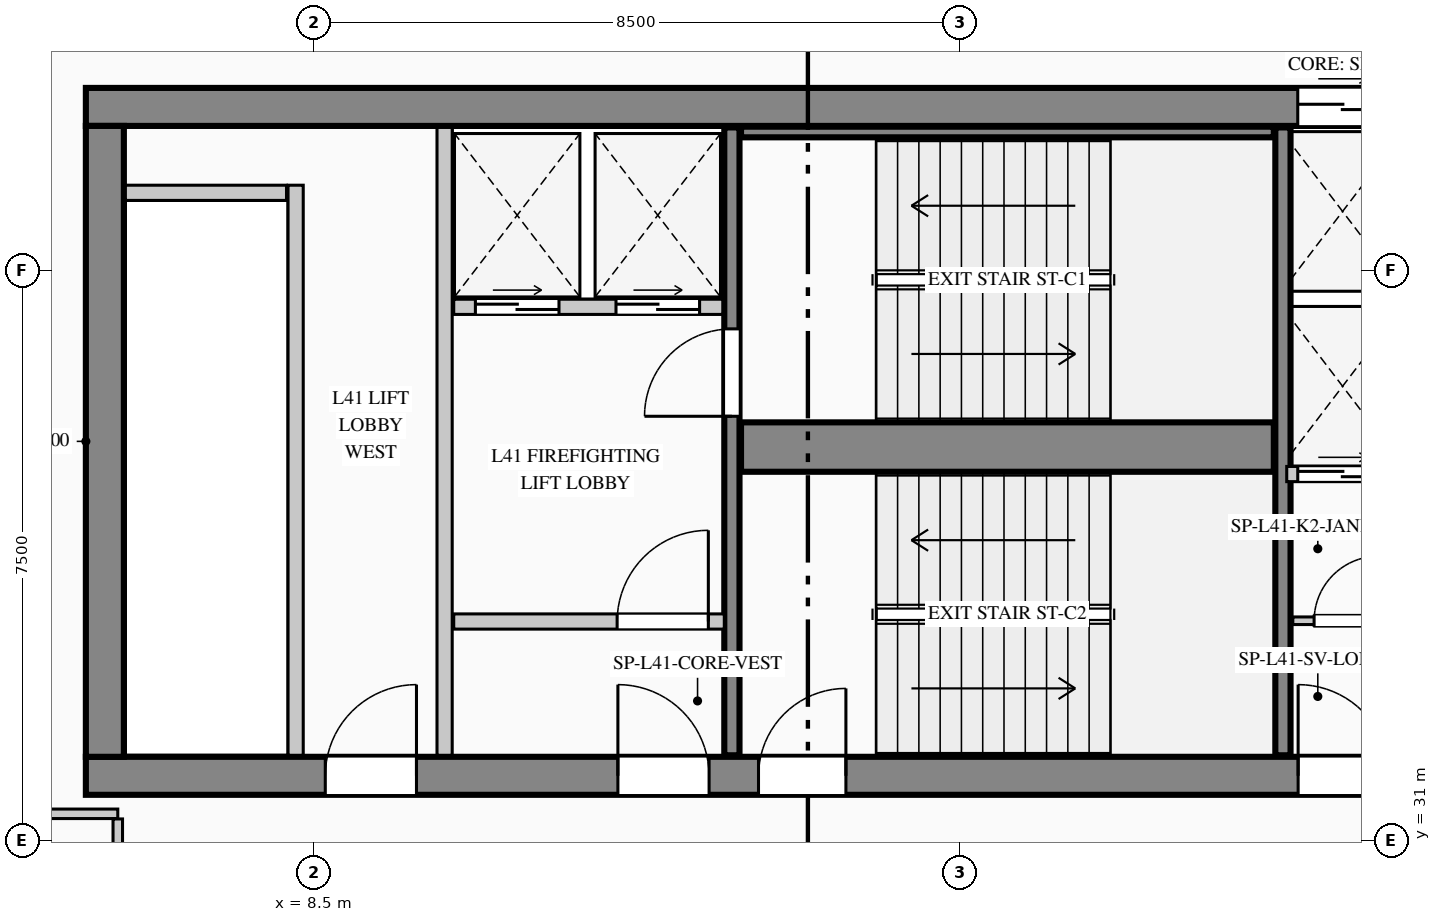
"""IFC4 building model, lengths in metres.
Left out: names, types, materials, properties, quantities, classifications, styles, units other than length and angle.
Written with IfcOpenShell. Run it as: python <this file> out.ifc"""

import sys

from ifc_helpers import new_model, si_unit, direction, frame, frame_2d, origin, place, context, subcontext, project, spatial, rectangle, extrude, element, fill, save


model = new_model("IFC4")
c1 = context("Model", 3, precision=1e-05, world=origin(), true_north=direction((0.0, 1.0)))
c2 = subcontext(c1, "Body", "Model", "MODEL_VIEW")
j1 = project(units=[si_unit("LENGTHUNIT", "METRE"), si_unit("PLANEANGLEUNIT", "RADIAN")], contexts=[c1])
p1 = place(None, origin())
s1 = spatial("IfcSite", under=j1, at=p1, CompositionType="ELEMENT")
p2 = place(p1, origin())
s2 = spatial("IfcBuilding", under=s1, at=p2, CompositionType="ELEMENT")
p3 = place(p2, frame((0.0, 0.0, 174.6)))
s3 = spatial("IfcBuildingStorey", under=s2, at=p3, CompositionType="ELEMENT", Elevation=174.6)
p4 = place(p3, frame((5.5, 40.65, 0.0), z_axis=(0.0, 0.0, 1.0), x_axis=(1.0, 0.0, 0.0)))
e1 = element("IfcWall", 1, at=p4, inside=s3, PredefinedType="SHEAR", context=c2, shape_type="SweptSolid", body=[
    extrude(rectangle(XDim=17.85, YDim=0.5, at=frame_2d((8.925, 0.0))), origin(), (0.0, 0.0, 1.0), 3.95),
])
p5 = place(p4, frame((15.945, 0.0, 0.0)))
e2 = element("IfcOpeningElement", 2, at=p5, cuts=e1, PredefinedType="OPENING", context=c2, shape_type="SweptSolid", body=[
    extrude(rectangle(XDim=1.18, YDim=2.25, at=frame_2d((0.59, 1.125))), frame((0.0, 0.26, 0.0), z_axis=(0.0, -1.0, 0.0), x_axis=(1.0, 0.0, 0.0)), (0.0, 0.0, 1.0), 0.52),
])
p6 = place(p3, frame((5.5, 31.85, 0.0), z_axis=(0.0, 0.0, 1.0), x_axis=(1.0, 0.0, 0.0)))
e3 = element("IfcWall", 3, at=p6, inside=s3, PredefinedType="SHEAR", context=c2, shape_type="SweptSolid", body=[
    extrude(rectangle(XDim=17.85, YDim=0.5, at=frame_2d((8.925, 0.0))), origin(), (0.0, 0.0, 1.0), 3.95),
])
p7 = place(p6, frame((3.15, 0.0, 0.0)))
e4 = element("IfcOpeningElement", 4, at=p7, cuts=e3, PredefinedType="OPENING", context=c2, shape_type="SweptSolid", body=[
    extrude(rectangle(XDim=1.2, YDim=2.2, at=frame_2d((0.6, 1.1))), frame((0.0, 0.26, 0.0), z_axis=(0.0, -1.0, 0.0), x_axis=(1.0, 0.0, 0.0)), (0.0, 0.0, 1.0), 0.52),
])
p8 = place(p6, frame((7.0, 0.0, 0.0)))
e5 = element("IfcOpeningElement", 5, at=p8, cuts=e3, PredefinedType="OPENING", context=c2, shape_type="SweptSolid", body=[
    extrude(rectangle(XDim=1.2, YDim=2.2, at=frame_2d((0.6, 1.1))), frame((0.0, 0.26, 0.0), z_axis=(0.0, -1.0, 0.0), x_axis=(1.0, 0.0, 0.0)), (0.0, 0.0, 1.0), 0.52),
])
p9 = place(p6, frame((8.85, 0.0, 0.0)))
e6 = element("IfcOpeningElement", 6, at=p9, cuts=e3, PredefinedType="OPENING", context=c2, shape_type="SweptSolid", body=[
    extrude(rectangle(XDim=1.15, YDim=2.2, at=frame_2d((0.575, 1.1))), frame((0.0, 0.26, 0.0), z_axis=(0.0, -1.0, 0.0), x_axis=(1.0, 0.0, 0.0)), (0.0, 0.0, 1.0), 0.52),
])
p10 = place(p6, frame((15.95, 0.0, 0.0)))
e7 = element("IfcOpeningElement", 7, at=p10, cuts=e3, PredefinedType="OPENING", context=c2, shape_type="SweptSolid", body=[
    extrude(rectangle(XDim=1.2, YDim=2.2, at=frame_2d((0.6, 1.1))), frame((0.0, 0.26, 0.0), z_axis=(0.0, -1.0, 0.0), x_axis=(1.0, 0.0, 0.0)), (0.0, 0.0, 1.0), 0.52),
])
p11 = place(p3, frame((5.75, 32.1, 0.0), z_axis=(0.0, 0.0, 1.0), x_axis=(0.0, 1.0, 0.0)))
e8 = element("IfcWall", 8, at=p11, inside=s3, PredefinedType="SHEAR", context=c2, shape_type="SweptSolid", body=[
    extrude(rectangle(XDim=8.3, YDim=0.5, at=frame_2d((4.15, 0.0))), origin(), (0.0, 0.0, 1.0), 3.95),
])
p12 = place(p3, frame((14.0, 32.12, 0.0), z_axis=(0.0, 0.0, 1.0), x_axis=(0.0, 1.0, 0.0)))
e9 = element("IfcWall", 9, at=p12, inside=s3, PredefinedType="SHEAR", context=c2, shape_type="SweptSolid", body=[
    extrude(rectangle(XDim=8.26, YDim=0.2, at=frame_2d((4.13, 0.0))), origin(), (0.0, 0.0, 1.0), 3.95),
])
p13 = place(p12, frame((4.46, 0.0, 0.0)))
e10 = element("IfcOpeningElement", 10, at=p13, cuts=e9, PredefinedType="OPENING", context=c2, shape_type="SweptSolid", body=[
    extrude(rectangle(XDim=1.15, YDim=2.2, at=frame_2d((0.575, 1.1))), frame((0.0, 0.11, 0.0), z_axis=(0.0, -1.0, 0.0), x_axis=(1.0, 0.0, 0.0)), (0.0, 0.0, 1.0), 0.22),
])
p14 = place(p3, frame((14.12, 36.175, 0.0), z_axis=(0.0, 0.0, 1.0), x_axis=(1.0, 0.0, 0.0)))
e11 = element("IfcWall", 11, at=p14, inside=s3, PredefinedType="SHEAR", context=c2, shape_type="SweptSolid", body=[
    extrude(rectangle(XDim=7.01, YDim=0.65, at=frame_2d((3.505, 0.0))), origin(), (0.0, 0.0, 1.0), 3.95),
])
p15 = place(p3, frame((21.25, 32.12, 0.0), z_axis=(0.0, 0.0, 1.0), x_axis=(0.0, 1.0, 0.0)))
e12 = element("IfcWall", 12, at=p15, inside=s3, PredefinedType="SHEAR", context=c2, shape_type="SweptSolid", body=[
    extrude(rectangle(XDim=8.26, YDim=0.2, at=frame_2d((4.13, 0.0))), origin(), (0.0, 0.0, 1.0), 3.95),
])
p16 = place(p3, frame((14.12, 40.32, 0.0), z_axis=(0.0, 0.0, 1.0), x_axis=(1.0, 0.0, 0.0)))
e13 = element("IfcWall", 13, at=p16, inside=s3, PredefinedType="SHEAR", context=c2, shape_type="SweptSolid", body=[
    extrude(rectangle(XDim=7.01, YDim=0.14, at=frame_2d((3.505, 0.0))), origin(), (0.0, 0.0, 1.0), 3.95),
])
p17 = place(p3, frame((7.993, 4.73, 0.0), z_axis=(0.0, 0.0, 1.0), x_axis=(-0.136989009016, 0.990572567462, 0.0)))
e14 = element("IfcWall", 14, at=p17, inside=s3, PredefinedType="STANDARD", context=c2, shape_type="SweptSolid", body=[
    extrude(rectangle(XDim=36.888, YDim=0.26, at=frame_2d((18.444, 0.0))), origin(), (0.0, 0.0, 1.0), 3.6),
])
p18 = place(p17, frame((20.949, 0.0, 0.9)))
e15 = element("IfcOpeningElement", 15, at=p18, cuts=e14, PredefinedType="OPENING", context=c2, shape_type="SweptSolid", body=[
    extrude(rectangle(XDim=2.1, YDim=2.0, at=frame_2d((1.05, 1.0))), frame((0.0, 0.14, 0.0), z_axis=(0.0, -1.0, 0.0), x_axis=(1.0, 0.0, 0.0)), (0.0, 0.0, 1.0), 0.28),
])
p19 = place(p3, frame((8.26, 32.12, 0.0), z_axis=(0.0, 0.0, 1.0), x_axis=(0.0, 1.0, 0.0)))
e16 = element("IfcWall", 16, at=p19, inside=s3, PredefinedType="PARTITIONING", context=c2, shape_type="SweptSolid", body=[
    extrude(rectangle(XDim=7.5, YDim=0.2, at=frame_2d((3.75, 0.0))), origin(), (0.0, 0.0, 1.0), 3.6),
])
p20 = place(p3, frame((6.02, 39.52, 0.0), z_axis=(0.0, 0.0, 1.0), x_axis=(1.0, 0.0, 0.0)))
e17 = element("IfcWall", 17, at=p20, inside=s3, PredefinedType="PARTITIONING", context=c2, shape_type="SweptSolid", body=[
    extrude(rectangle(XDim=2.12, YDim=0.2, at=frame_2d((1.06, 0.0))), origin(), (0.0, 0.0, 1.0), 3.6),
])
p21 = place(p3, frame((10.22, 32.12, 0.0), z_axis=(0.0, 0.0, 1.0), x_axis=(0.0, 1.0, 0.0)))
e18 = element("IfcWall", 18, at=p21, inside=s3, PredefinedType="PARTITIONING", context=c2, shape_type="SweptSolid", body=[
    extrude(rectangle(XDim=8.26, YDim=0.2, at=frame_2d((4.13, 0.0))), origin(), (0.0, 0.0, 1.0), 3.6),
])
p22 = place(p3, frame((10.34, 38.02, 0.0), z_axis=(0.0, 0.0, 1.0), x_axis=(1.0, 0.0, 0.0)))
e19 = element("IfcWall", 19, at=p22, inside=s3, PredefinedType="PARTITIONING", context=c2, shape_type="SweptSolid", body=[
    extrude(rectangle(XDim=3.54, YDim=0.2, at=frame_2d((1.77, 0.0))), origin(), (0.0, 0.0, 1.0), 3.6),
])
p23 = place(p22, frame((0.285, 0.0, 0.0)))
e20 = element("IfcOpeningElement", 20, at=p23, cuts=e19, PredefinedType="OPENING", context=c2, shape_type="SweptSolid", body=[
    extrude(rectangle(XDim=1.1, YDim=2.2, at=frame_2d((0.55, 1.1))), frame((0.0, 0.11, 0.0), z_axis=(0.0, -1.0, 0.0), x_axis=(1.0, 0.0, 0.0)), (0.0, 0.0, 1.0), 0.22),
])
p24 = place(p22, frame((2.135, 0.0, 0.0)))
e21 = element("IfcOpeningElement", 21, at=p24, cuts=e19, PredefinedType="OPENING", context=c2, shape_type="SweptSolid", body=[
    extrude(rectangle(XDim=1.1, YDim=2.2, at=frame_2d((0.55, 1.1))), frame((0.0, 0.11, 0.0), z_axis=(0.0, -1.0, 0.0), x_axis=(1.0, 0.0, 0.0)), (0.0, 0.0, 1.0), 0.22),
])
p25 = place(p3, frame((10.34, 33.88, 0.0), z_axis=(0.0, 0.0, 1.0), x_axis=(1.0, 0.0, 0.0)))
e22 = element("IfcWall", 22, at=p25, inside=s3, PredefinedType="PARTITIONING", context=c2, shape_type="SweptSolid", body=[
    extrude(rectangle(XDim=3.56, YDim=0.2, at=frame_2d((1.78, 0.0))), origin(), (0.0, 0.0, 1.0), 3.6),
])
p26 = place(p25, frame((2.15, 0.0, 0.0)))
e23 = element("IfcOpeningElement", 23, at=p26, cuts=e22, PredefinedType="OPENING", context=c2, shape_type="SweptSolid", body=[
    extrude(rectangle(XDim=1.2, YDim=2.2, at=frame_2d((0.6, 1.1))), frame((0.0, 0.11, 0.0), z_axis=(0.0, -1.0, 0.0), x_axis=(1.0, 0.0, 0.0)), (0.0, 0.0, 1.0), 0.22),
])
p27 = place(p3, frame((21.38, 33.89, 0.0), z_axis=(0.0, 0.0, 1.0), x_axis=(1.0, 0.0, 0.0)))
e24 = element("IfcWall", 24, at=p27, inside=s3, PredefinedType="PARTITIONING", context=c2, shape_type="SweptSolid", body=[
    extrude(rectangle(XDim=1.42, YDim=0.1, at=frame_2d((0.71, 0.0))), origin(), (0.0, 0.0, 1.0), 3.6),
])
p28 = place(p27, frame((0.28, 0.0, 0.0)))
e25 = element("IfcOpeningElement", 25, at=p28, cuts=e24, PredefinedType="OPENING", context=c2, shape_type="SweptSolid", body=[
    extrude(rectangle(XDim=0.85, YDim=2.1, at=frame_2d((0.425, 1.05))), frame((0.0, 0.06, 0.0), z_axis=(0.0, -1.0, 0.0), x_axis=(1.0, 0.0, 0.0)), (0.0, 0.0, 1.0), 0.12),
])
p29 = place(p3, frame((21.3, 35.82, 0.0), z_axis=(0.0, 0.0, 1.0), x_axis=(1.0, 0.0, 0.0)))
e26 = element("IfcWall", 26, at=p29, inside=s3, PredefinedType="PARTITIONING", context=c2, shape_type="SweptSolid", body=[
    extrude(rectangle(XDim=1.5, YDim=0.2, at=frame_2d((0.75, 0.0))), origin(), (0.0, 0.0, 1.0), 3.6),
])
p30 = place(p29, frame((0.145, 0.0, 0.0)))
e27 = element("IfcOpeningElement", 27, at=p30, cuts=e26, PredefinedType="OPENING", context=c2, shape_type="SweptSolid", body=[
    extrude(rectangle(XDim=1.18, YDim=2.25, at=frame_2d((0.59, 1.125))), frame((0.0, 0.11, 0.0), z_axis=(0.0, -1.0, 0.0), x_axis=(1.0, 0.0, 0.0)), (0.0, 0.0, 1.0), 0.22),
])
p31 = place(p3, frame((4.448, 31.35, 0.0), z_axis=(0.0, 0.0, 1.0), x_axis=(1.0, 0.0, 0.0)))
e28 = element("IfcWall", 28, at=p31, inside=s3, PredefinedType="PARTITIONING", context=c2, shape_type="SweptSolid", body=[
    extrude(rectangle(XDim=1.472, YDim=0.125, at=frame_2d((0.736, 0.0))), origin(), (0.0, 0.0, 1.0), 3.6),
])
p32 = place(p3, frame((5.92, 31.282, 0.0), z_axis=(0.0, 0.0, 1.0), x_axis=(0.0, -1.0, 0.0)))
e29 = element("IfcWall", 29, at=p32, inside=s3, PredefinedType="PARTITIONING", context=c2, shape_type="SweptSolid", body=[
    extrude(rectangle(XDim=2.682, YDim=0.125, at=frame_2d((1.341, 0.0))), origin(), (0.0, 0.0, 1.0), 3.6),
])
p33 = place(p7, origin())
e30 = element("IfcDoor", 30, at=p33, inside=s3, OperationType="SINGLE_SWING_RIGHT", PredefinedType="DOOR", context=c2, shape_type="SweptSolid", body=[
    extrude(rectangle(XDim=1.2, YDim=2.2, at=frame_2d((0.6, 1.1))), frame((0.0, 0.025, 0.0), z_axis=(0.0, -1.0, 0.0), x_axis=(1.0, 0.0, 0.0)), (0.0, 0.0, 1.0), 0.05),
])
fill(e4, e30)
p34 = place(p8, origin())
e31 = element("IfcDoor", 31, at=p34, inside=s3, OperationType="SINGLE_SWING_LEFT", PredefinedType="DOOR", context=c2, shape_type="SweptSolid", body=[
    extrude(rectangle(XDim=1.2, YDim=2.2, at=frame_2d((0.6, 1.1))), frame((0.0, 0.025, 0.0), z_axis=(0.0, -1.0, 0.0), x_axis=(1.0, 0.0, 0.0)), (0.0, 0.0, 1.0), 0.05),
])
fill(e5, e31)
p35 = place(p9, origin())
e32 = element("IfcDoor", 32, at=p35, inside=s3, OperationType="SINGLE_SWING_RIGHT", PredefinedType="DOOR", context=c2, shape_type="SweptSolid", body=[
    extrude(rectangle(XDim=1.15, YDim=2.2, at=frame_2d((0.575, 1.1))), frame((0.0, 0.025, 0.0), z_axis=(0.0, -1.0, 0.0), x_axis=(1.0, 0.0, 0.0)), (0.0, 0.0, 1.0), 0.05),
])
fill(e6, e32)
p36 = place(p10, origin())
e33 = element("IfcDoor", 33, at=p36, inside=s3, OperationType="SINGLE_SWING_LEFT", PredefinedType="DOOR", context=c2, shape_type="SweptSolid", body=[
    extrude(rectangle(XDim=1.2, YDim=2.2, at=frame_2d((0.6, 1.1))), frame((0.0, 0.025, 0.0), z_axis=(0.0, -1.0, 0.0), x_axis=(1.0, 0.0, 0.0)), (0.0, 0.0, 1.0), 0.05),
])
fill(e7, e33)
p37 = place(p26, origin())
e34 = element("IfcDoor", 34, at=p37, inside=s3, OperationType="SINGLE_SWING_RIGHT", PredefinedType="DOOR", context=c2, shape_type="SweptSolid", body=[
    extrude(rectangle(XDim=1.2, YDim=2.2, at=frame_2d((0.6, 1.1))), frame((0.0, 0.025, 0.0), z_axis=(0.0, -1.0, 0.0), x_axis=(1.0, 0.0, 0.0)), (0.0, 0.0, 1.0), 0.05),
])
fill(e23, e34)
p38 = place(p28, origin())
e35 = element("IfcDoor", 35, at=p38, inside=s3, OperationType="SINGLE_SWING_RIGHT", PredefinedType="DOOR", context=c2, shape_type="SweptSolid", body=[
    extrude(rectangle(XDim=0.85, YDim=2.1, at=frame_2d((0.425, 1.05))), frame((0.0, 0.025, 0.0), z_axis=(0.0, -1.0, 0.0), x_axis=(1.0, 0.0, 0.0)), (0.0, 0.0, 1.0), 0.05),
])
fill(e25, e35)
p39 = place(p13, origin())
e36 = element("IfcDoor", 36, at=p39, inside=s3, OperationType="SINGLE_SWING_LEFT", PredefinedType="DOOR", context=c2, shape_type="SweptSolid", body=[
    extrude(rectangle(XDim=1.15, YDim=2.2, at=frame_2d((0.575, 1.1))), frame((0.0, 0.025, 0.0), z_axis=(0.0, -1.0, 0.0), x_axis=(1.0, 0.0, 0.0)), (0.0, 0.0, 1.0), 0.05),
])
fill(e10, e36)
p40 = place(p23, origin())
e37 = element("IfcDoor", 37, at=p40, inside=s3, OperationType="DOUBLE_DOOR_SLIDING", PredefinedType="DOOR", context=c2, shape_type="SweptSolid", body=[
    extrude(rectangle(XDim=1.1, YDim=2.2, at=frame_2d((0.55, 1.1))), frame((0.0, 0.025, 0.0), z_axis=(0.0, -1.0, 0.0), x_axis=(1.0, 0.0, 0.0)), (0.0, 0.0, 1.0), 0.05),
])
fill(e20, e37)
p41 = place(p24, origin())
e38 = element("IfcDoor", 38, at=p41, inside=s3, OperationType="DOUBLE_DOOR_SLIDING", PredefinedType="DOOR", context=c2, shape_type="SweptSolid", body=[
    extrude(rectangle(XDim=1.1, YDim=2.2, at=frame_2d((0.55, 1.1))), frame((0.0, 0.025, 0.0), z_axis=(0.0, -1.0, 0.0), x_axis=(1.0, 0.0, 0.0)), (0.0, 0.0, 1.0), 0.05),
])
fill(e21, e38)
p42 = place(p5, origin())
e39 = element("IfcDoor", 39, at=p42, inside=s3, OperationType="DOUBLE_DOOR_SLIDING", PredefinedType="DOOR", context=c2, shape_type="SweptSolid", body=[
    extrude(rectangle(XDim=1.18, YDim=2.25, at=frame_2d((0.59, 1.125))), frame((0.0, 0.025, 0.0), z_axis=(0.0, -1.0, 0.0), x_axis=(1.0, 0.0, 0.0)), (0.0, 0.0, 1.0), 0.05),
])
fill(e2, e39)
p43 = place(p30, origin())
e40 = element("IfcDoor", 40, at=p43, inside=s3, OperationType="DOUBLE_DOOR_SLIDING", PredefinedType="DOOR", context=c2, shape_type="SweptSolid", body=[
    extrude(rectangle(XDim=1.18, YDim=2.25, at=frame_2d((0.59, 1.125))), frame((0.0, 0.025, 0.0), z_axis=(0.0, -1.0, 0.0), x_axis=(1.0, 0.0, 0.0)), (0.0, 0.0, 1.0), 0.05),
])
fill(e27, e40)
save(model, sys.argv[1])
